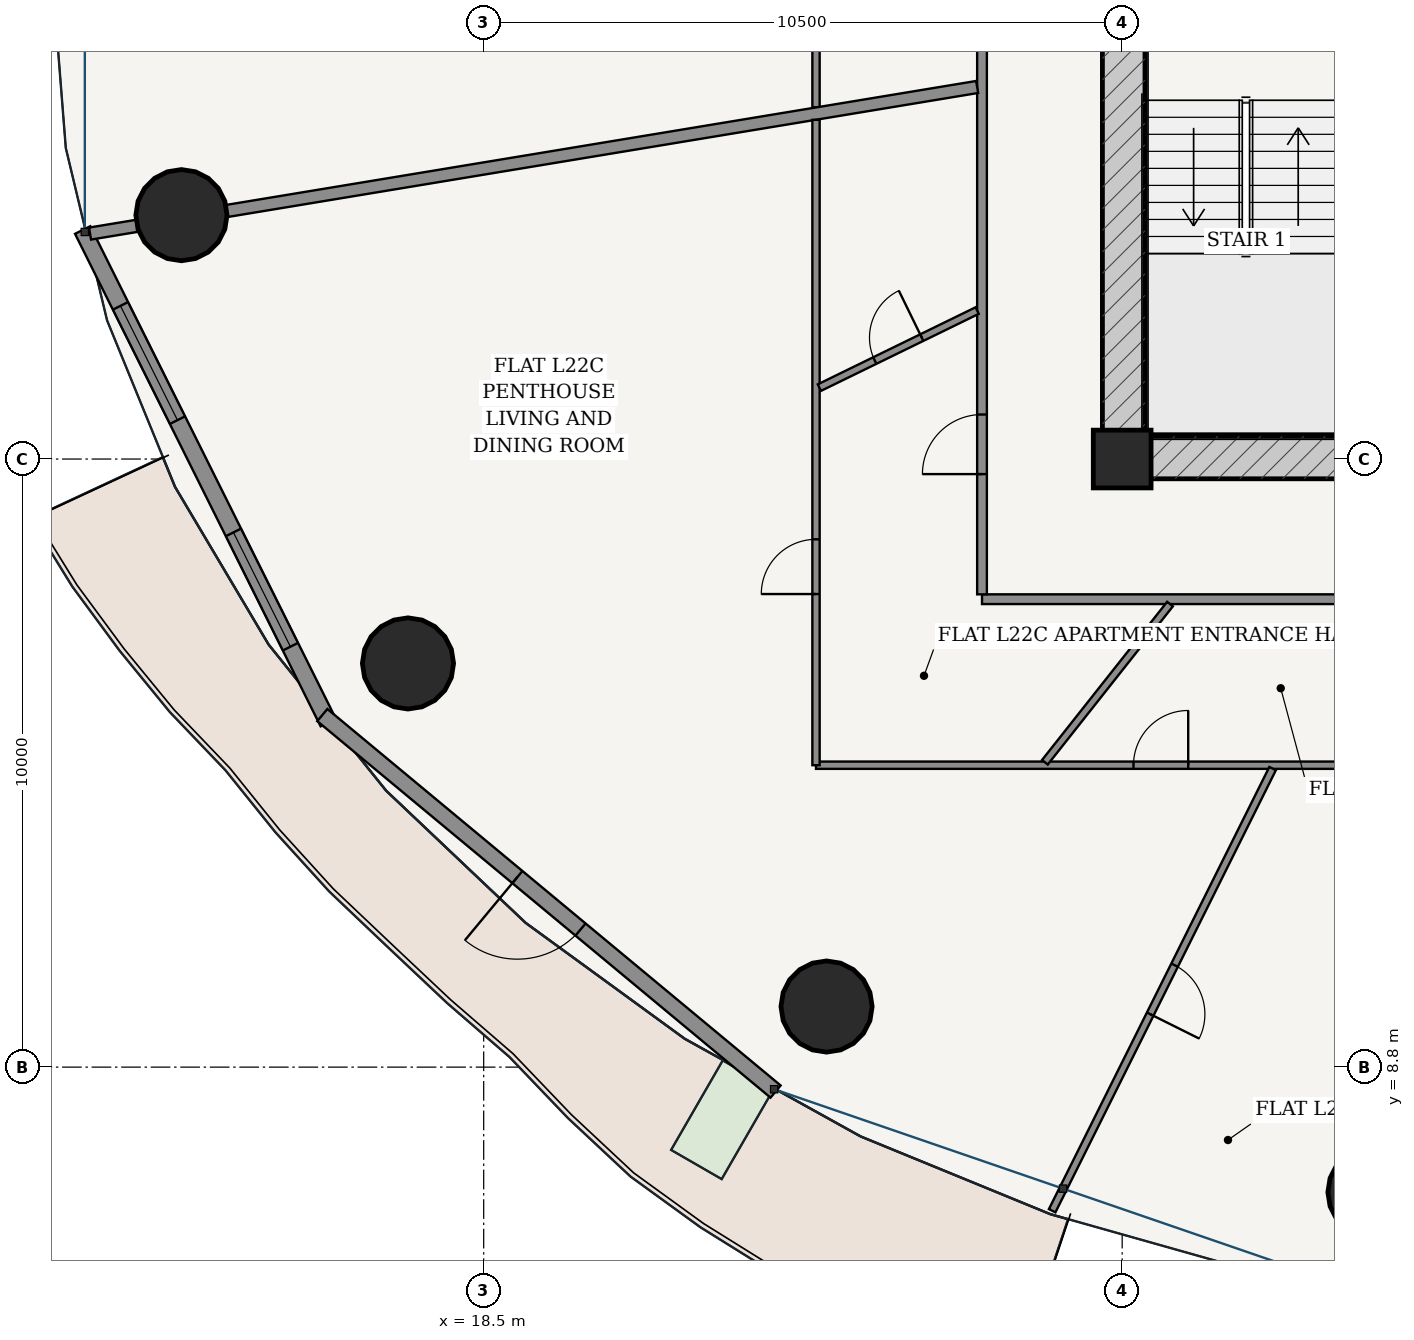
"""IFC4 building model, lengths in metres.
Left out: names, types, materials, properties, quantities, classifications, styles, units other than length and angle.
Written with IfcOpenShell. Run it as: python <this file> out.ifc"""

import sys

from ifc_helpers import new_model, si_unit, direction, frame, frame_2d, origin, origin_2d, place, context, subcontext, project, spatial, rectangle, hollow_circle, extrude, source, transform, mapped, element, fill, save


model = new_model("IFC4")
c1 = context("Model", 3, precision=1e-05, world=origin(), true_north=direction((-0.2419218956, 0.970295726276)))
c2 = subcontext(c1, "Body", "Model", "MODEL_VIEW")
j1 = project(units=[si_unit("LENGTHUNIT", "METRE"), si_unit("PLANEANGLEUNIT", "RADIAN")], contexts=[c1])
p1 = place(None, origin())
s1 = spatial("IfcSite", under=j1, at=p1, CompositionType="ELEMENT")
p2 = place(p1, origin())
s2 = spatial("IfcBuilding", under=s1, at=p2, CompositionType="ELEMENT")
p3 = place(p2, frame((0.0, 0.0, 87.0)))
s3 = spatial("IfcBuildingStorey", under=s2, at=p3, CompositionType="ELEMENT", Elevation=87.0)
p4 = place(p3, frame((29.0, 18.8, 0.0), z_axis=(0.0, 0.0, 1.0), x_axis=(1.0, 0.0, 0.0)))
e1 = element("IfcColumn", 1, at=p4, inside=s3, PredefinedType="COLUMN", context=c2, shape_type="SweptSolid", body=[
    extrude(rectangle(XDim=0.95, YDim=0.95, at=origin_2d()), origin(), (0.0, 0.0, 1.0), 3.6),
])
p5 = place(p3, frame((28.675, 18.825, 0.0), z_axis=(0.0, 0.0, 1.0), x_axis=(1.0, 0.0, 0.0)))
e2 = element("IfcWall", 2, at=p5, inside=s3, PredefinedType="SHEAR", context=c2, shape_type="SweptSolid", body=[
    extrude(rectangle(XDim=18.65, YDim=0.7, at=frame_2d((9.325, 0.0))), origin(), (0.0, 0.0, 1.0), 3.325),
])
p6 = place(p5, frame((7.577, 0.0, 0.0)))
e3 = element("IfcOpeningElement", 3, at=p6, cuts=e2, PredefinedType="OPENING", context=c2, shape_type="SweptSolid", body=[
    extrude(rectangle(XDim=0.85, YDim=2.1, at=frame_2d((0.425, 1.05))), frame((0.0, 0.36, 0.0), z_axis=(0.0, -1.0, 0.0), x_axis=(1.0, 0.0, 0.0)), (0.0, 0.0, 1.0), 0.72),
])
p7 = place(p5, frame((10.623, 0.0, 0.0)))
e4 = element("IfcOpeningElement", 4, at=p7, cuts=e2, PredefinedType="OPENING", context=c2, shape_type="SweptSolid", body=[
    extrude(rectangle(XDim=0.85, YDim=2.1, at=frame_2d((0.425, 1.05))), frame((0.0, 0.36, 0.0), z_axis=(0.0, -1.0, 0.0), x_axis=(1.0, 0.0, 0.0)), (0.0, 0.0, 1.0), 0.72),
])
p8 = place(p3, frame((29.025, 19.175, 0.0), z_axis=(0.0, 0.0, 1.0), x_axis=(0.0, 1.0, 0.0)))
e5 = element("IfcWall", 5, at=p8, inside=s3, PredefinedType="SHEAR", context=c2, shape_type="SweptSolid", body=[
    extrude(rectangle(XDim=15.25, YDim=0.7, at=frame_2d((7.625, 0.0))), origin(), (0.0, 0.0, 1.0), 3.325),
])
p9 = place(p8, frame((9.875, 0.0, 0.0)))
e6 = element("IfcOpeningElement", 6, at=p9, cuts=e5, PredefinedType="OPENING", context=c2, shape_type="SweptSolid", body=[
    extrude(rectangle(XDim=1.5, YDim=2.2, at=frame_2d((0.75, 1.1))), frame((0.0, 0.36, 0.0), z_axis=(0.0, -1.0, 0.0), x_axis=(1.0, 0.0, 0.0)), (0.0, 0.0, 1.0), 0.72),
])
for number, where, z_axis, x_axis in (
    (7, (13.529, 22.81, 0.0), (0.0, 0.0, 1.0), (1.0, 0.0, 0.0)),
    (8, (17.255, 15.438, 0.0), (0.0, 0.0, 1.0), (1.0, 0.0, 0.0)),
    (9, (24.138, 9.796, 0.0), (0.0, 0.0, 1.0), (1.0, 0.0, 0.0)),
    (10, (33.133, 6.743, 0.0), (0.0, 0.0, 1.0), (1.0, 0.0, 0.0)),
):
    element("IfcColumn", number, at=place(p3, frame(where, z_axis=z_axis, x_axis=x_axis)), inside=s3, PredefinedType="COLUMN", context=c2, shape_type="SweptSolid", body=[
        extrude(hollow_circle(Radius=0.75, WallThickness=0.045, at=origin_2d()), origin(), (0.0, 0.0, 1.0), 3.6),
    ])
p10 = place(p3, frame((11.905, 22.566, 0.0), z_axis=(0.0, 0.0, 1.0), x_axis=(0.446274562077, -0.894896091869, 0.0)))
e11 = element("IfcWall", 11, at=p10, inside=s3, PredefinedType="SOLIDWALL", context=c2, shape_type="SweptSolid", body=[
    extrude(rectangle(XDim=9.05, YDim=0.28, at=frame_2d((4.525, 0.0))), origin(), (0.0, 0.0, 1.0), 3.325),
])
p11 = place(p10, frame((1.394, 0.0, 0.85)))
e12 = element("IfcOpeningElement", 12, at=p11, cuts=e11, PredefinedType="OPENING", context=c2, shape_type="SweptSolid", body=[
    extrude(rectangle(XDim=2.1, YDim=1.95, at=frame_2d((1.05, 0.975))), frame((0.0, 0.15, 0.0), z_axis=(0.0, -1.0, 0.0), x_axis=(1.0, 0.0, 0.0)), (0.0, 0.0, 1.0), 0.3),
])
p12 = place(p10, frame((5.557, 0.0, 0.85)))
e13 = element("IfcOpeningElement", 13, at=p12, cuts=e11, PredefinedType="OPENING", context=c2, shape_type="SweptSolid", body=[
    extrude(rectangle(XDim=2.1, YDim=1.95, at=frame_2d((1.05, 0.975))), frame((0.0, 0.15, 0.0), z_axis=(0.0, -1.0, 0.0), x_axis=(1.0, 0.0, 0.0)), (0.0, 0.0, 1.0), 0.3),
])
p13 = place(p3, frame((15.846, 14.59, 0.0), z_axis=(0.0, 0.0, 1.0), x_axis=(0.769254958887, -0.638941944333, 0.0)))
e14 = element("IfcWall", 14, at=p13, inside=s3, PredefinedType="SOLIDWALL", context=c2, shape_type="SweptSolid", body=[
    extrude(rectangle(XDim=9.69, YDim=0.26, at=frame_2d((4.845, 0.0))), origin(), (0.0, 0.0, 1.0), 3.325),
])
p14 = place(p13, frame((4.17, 0.0, 0.0)))
e15 = element("IfcOpeningElement", 15, at=p14, cuts=e14, PredefinedType="OPENING", context=c2, shape_type="SweptSolid", body=[
    extrude(rectangle(XDim=1.35, YDim=2.2, at=frame_2d((0.675, 1.1))), frame((0.0, 0.14, 0.0), z_axis=(0.0, -1.0, 0.0), x_axis=(1.0, 0.0, 0.0)), (0.0, 0.0, 1.0), 0.28),
])
p15 = place(p3, frame((26.695, 16.495, 0.0), z_axis=(0.0, 0.0, 1.0), x_axis=(1.0, 0.0, 0.0)))
e16 = element("IfcWall", 16, at=p15, inside=s3, PredefinedType="PARTITIONING", context=c2, shape_type="SweptSolid", body=[
    extrude(rectangle(XDim=22.61, YDim=0.16, at=frame_2d((11.305, 0.0))), origin(), (0.0, 0.0, 1.0), 2.767),
])
p16 = place(p3, frame((26.695, 16.575, 0.0), z_axis=(0.0, 0.0, 1.0), x_axis=(0.0, 1.0, 0.0)))
e17 = element("IfcWall", 17, at=p16, inside=s3, PredefinedType="PARTITIONING", context=c2, shape_type="SweptSolid", body=[
    extrude(rectangle(XDim=20.45, YDim=0.16, at=frame_2d((10.225, 0.0))), origin(), (0.0, 0.0, 1.0), 2.767),
])
p17 = place(p16, frame((1.977, 0.0, 0.0)))
e18 = element("IfcOpeningElement", 18, at=p17, cuts=e17, PredefinedType="OPENING", context=c2, shape_type="SweptSolid", body=[
    extrude(rectangle(XDim=0.98, YDim=2.2, at=frame_2d((0.49, 1.1))), frame((0.0, 0.09, 0.0), z_axis=(0.0, -1.0, 0.0), x_axis=(1.0, 0.0, 0.0)), (0.0, 0.0, 1.0), 0.18),
])
p18 = place(p3, frame((23.965, 24.583, 0.0), z_axis=(0.0, 0.0, 1.0), x_axis=(0.0, 1.0, 0.0)))
e19 = element("IfcWall", 19, at=p18, inside=s3, PredefinedType="PARTITIONING", context=c2, shape_type="SweptSolid", body=[
    extrude(rectangle(XDim=15.252, YDim=0.12, at=frame_2d((7.626, 0.0))), origin(), (0.0, 0.0, 1.0), 2.767),
])
p19 = place(p3, frame((26.615, 24.918, 0.0), z_axis=(0.0, 0.0, 1.0), x_axis=(-0.986618789677, -0.163044054958, 0.0)))
e20 = element("IfcWall", 20, at=p19, inside=s3, PredefinedType="PARTITIONING", context=c2, shape_type="SweptSolid", body=[
    extrude(rectangle(XDim=14.787, YDim=0.2, at=frame_2d((7.393, 0.0))), origin(), (0.0, 0.0, 1.0), 2.767),
])
p20 = place(p3, frame((41.019, 13.765, 0.0), z_axis=(0.0, 0.0, 1.0), x_axis=(-1.0, 0.0, 0.0)))
e21 = element("IfcWall", 21, at=p20, inside=s3, PredefinedType="PARTITIONING", context=c2, shape_type="SweptSolid", body=[
    extrude(rectangle(XDim=17.054, YDim=0.12, at=frame_2d((8.527, 0.0))), origin(), (0.0, 0.0, 1.0), 2.767),
])
p21 = place(p20, frame((10.933, 0.0, 0.0)))
e22 = element("IfcOpeningElement", 22, at=p21, cuts=e21, PredefinedType="OPENING", context=c2, shape_type="SweptSolid", body=[
    extrude(rectangle(XDim=0.9, YDim=2.15, at=frame_2d((0.45, 1.075))), frame((0.0, 0.07, 0.0), z_axis=(0.0, -1.0, 0.0), x_axis=(1.0, 0.0, 0.0)), (0.0, 0.0, 1.0), 0.14),
])
p22 = place(p3, frame((23.965, 13.765, 0.0), z_axis=(0.0, 0.0, 1.0), x_axis=(0.0, 1.0, 0.0)))
e23 = element("IfcWall", 23, at=p22, inside=s3, PredefinedType="PARTITIONING", context=c2, shape_type="SweptSolid", body=[
    extrude(rectangle(XDim=10.614, YDim=0.12, at=frame_2d((5.307, 0.0))), origin(), (0.0, 0.0, 1.0), 2.767),
])
p23 = place(p22, frame((2.815, 0.0, 0.0)))
e24 = element("IfcOpeningElement", 24, at=p23, cuts=e23, PredefinedType="OPENING", context=c2, shape_type="SweptSolid", body=[
    extrude(rectangle(XDim=0.9, YDim=2.15, at=frame_2d((0.45, 1.075))), frame((0.0, 0.07, 0.0), z_axis=(0.0, -1.0, 0.0), x_axis=(1.0, 0.0, 0.0)), (0.0, 0.0, 1.0), 0.14),
])
p24 = place(p3, frame((31.474, 13.709, 0.0), z_axis=(0.0, 0.0, 1.0), x_axis=(-0.446179583353, -0.894943450392, 0.0)))
e25 = element("IfcWall", 25, at=p24, inside=s3, PredefinedType="PARTITIONING", context=c2, shape_type="SweptSolid", body=[
    extrude(rectangle(XDim=8.125, YDim=0.12, at=frame_2d((4.062, 0.0))), origin(), (0.0, 0.0, 1.0), 2.767),
])
p25 = place(p24, frame((3.612, 0.0, 0.0)))
e26 = element("IfcOpeningElement", 26, at=p25, cuts=e25, PredefinedType="OPENING", context=c2, shape_type="SweptSolid", body=[
    extrude(rectangle(XDim=0.9, YDim=2.15, at=frame_2d((0.45, 1.075))), frame((0.0, 0.07, 0.0), z_axis=(0.0, -1.0, 0.0), x_axis=(1.0, 0.0, 0.0)), (0.0, 0.0, 1.0), 0.14),
])
p26 = place(p3, frame((26.615, 21.241, 0.0), z_axis=(0.0, 0.0, 1.0), x_axis=(-0.898615592274, -0.438736842906, 0.0)))
e27 = element("IfcWall", 27, at=p26, inside=s3, PredefinedType="PARTITIONING", context=c2, shape_type="SweptSolid", body=[
    extrude(rectangle(XDim=2.887, YDim=0.12, at=frame_2d((1.443, 0.0))), origin(), (0.0, 0.0, 1.0), 3.325),
])
p27 = place(p26, frame((1.013, 0.0, 0.0)))
e28 = element("IfcOpeningElement", 28, at=p27, cuts=e27, PredefinedType="OPENING", context=c2, shape_type="SweptSolid", body=[
    extrude(rectangle(XDim=0.86, YDim=2.15, at=frame_2d((0.43, 1.075))), frame((0.0, 0.07, 0.0), z_axis=(0.0, -1.0, 0.0), x_axis=(1.0, 0.0, 0.0)), (0.0, 0.0, 1.0), 0.14),
])
p28 = place(p3, frame((29.787, 16.415, 0.0), z_axis=(0.0, 0.0, 1.0), x_axis=(-0.62033143471, -0.784339793145, 0.0)))
e29 = element("IfcWall", 29, at=p28, inside=s3, PredefinedType="PARTITIONING", context=c2, shape_type="SweptSolid", body=[
    extrude(rectangle(XDim=3.317, YDim=0.12, at=frame_2d((1.658, 0.0))), origin(), (0.0, 0.0, 1.0), 3.004),
])
m1 = source(origin(), c2, "Body", "SweptSolid", [
    extrude(rectangle(XDim=2.1, YDim=1.95, at=frame_2d((1.05, 0.975))), frame((0.0, 0.03, 0.0), z_axis=(0.0, -1.0, 0.0), x_axis=(1.0, 0.0, 0.0)), (0.0, 0.0, 1.0), 0.06),
])
p29 = place(p11, origin())
e30 = element("IfcWindow", 30, at=p29, inside=s3, PartitioningType="SINGLE_PANEL", PredefinedType="WINDOW", context=c2, shape_type="MappedRepresentation", body=[
    mapped(m1, transform((0.0, 0.0, 0.0), scale=1.0)),
])
fill(e12, e30)
p30 = place(p12, origin())
e31 = element("IfcWindow", 31, at=p30, inside=s3, PartitioningType="SINGLE_PANEL", PredefinedType="WINDOW", context=c2, shape_type="MappedRepresentation", body=[
    mapped(m1, transform((0.0, 0.0, 0.0), scale=1.0)),
])
fill(e13, e31)
m2 = source(origin(), c2, "Body", "SweptSolid", [
    extrude(rectangle(XDim=1.35, YDim=2.2, at=frame_2d((0.675, 1.1))), frame((0.0, 0.025, 0.0), z_axis=(0.0, -1.0, 0.0), x_axis=(1.0, 0.0, 0.0)), (0.0, 0.0, 1.0), 0.05),
])
p31 = place(p14, frame((1.35, 0.0, 0.0), z_axis=(0.0, 0.0, 1.0), x_axis=(-1.0, 0.0, 0.0)))
e32 = element("IfcDoor", 32, at=p31, inside=s3, OperationType="SINGLE_SWING_RIGHT", PredefinedType="DOOR", context=c2, shape_type="MappedRepresentation", body=[
    mapped(m2, transform((0.0, 0.0, 0.0), scale=1.0)),
])
fill(e15, e32)
m3 = source(origin(), c2, "Body", "SweptSolid", [
    extrude(rectangle(XDim=0.98, YDim=2.2, at=frame_2d((0.49, 1.1))), frame((0.0, 0.025, 0.0), z_axis=(0.0, -1.0, 0.0), x_axis=(1.0, 0.0, 0.0)), (0.0, 0.0, 1.0), 0.05),
])
p32 = place(p17, origin())
e33 = element("IfcDoor", 33, at=p32, inside=s3, OperationType="SINGLE_SWING_LEFT", PredefinedType="DOOR", context=c2, shape_type="MappedRepresentation", body=[
    mapped(m3, transform((0.0, 0.0, 0.0), scale=1.0)),
])
fill(e18, e33)
m4 = source(origin(), c2, "Body", "SweptSolid", [
    extrude(rectangle(XDim=0.86, YDim=2.15, at=frame_2d((0.43, 1.075))), frame((0.0, 0.025, 0.0), z_axis=(0.0, -1.0, 0.0), x_axis=(1.0, 0.0, 0.0)), (0.0, 0.0, 1.0), 0.05),
])
p33 = place(p27, frame((0.86, 0.0, 0.0), z_axis=(0.0, 0.0, 1.0), x_axis=(-1.0, 0.0, 0.0)))
e34 = element("IfcDoor", 34, at=p33, inside=s3, OperationType="SINGLE_SWING_RIGHT", PredefinedType="DOOR", context=c2, shape_type="MappedRepresentation", body=[
    mapped(m4, transform((0.0, 0.0, 0.0), scale=1.0)),
])
fill(e28, e34)
m5 = source(origin(), c2, "Body", "SweptSolid", [
    extrude(rectangle(XDim=0.9, YDim=2.15, at=frame_2d((0.45, 1.075))), frame((0.0, 0.025, 0.0), z_axis=(0.0, -1.0, 0.0), x_axis=(1.0, 0.0, 0.0)), (0.0, 0.0, 1.0), 0.05),
])
p34 = place(p23, origin())
e35 = element("IfcDoor", 35, at=p34, inside=s3, OperationType="SINGLE_SWING_LEFT", PredefinedType="DOOR", context=c2, shape_type="MappedRepresentation", body=[
    mapped(m5, transform((0.0, 0.0, 0.0), scale=1.0)),
])
fill(e24, e35)
p35 = place(p21, frame((0.9, 0.0, 0.0), z_axis=(0.0, 0.0, 1.0), x_axis=(-1.0, 0.0, 0.0)))
e36 = element("IfcDoor", 36, at=p35, inside=s3, OperationType="SINGLE_SWING_RIGHT", PredefinedType="DOOR", context=c2, shape_type="MappedRepresentation", body=[
    mapped(m5, transform((0.0, 0.0, 0.0), scale=1.0)),
])
fill(e22, e36)
p36 = place(p25, origin())
e37 = element("IfcDoor", 37, at=p36, inside=s3, OperationType="SINGLE_SWING_RIGHT", PredefinedType="DOOR", context=c2, shape_type="MappedRepresentation", body=[
    mapped(m5, transform((0.0, 0.0, 0.0), scale=1.0)),
])
fill(e26, e37)
save(model, sys.argv[1])
